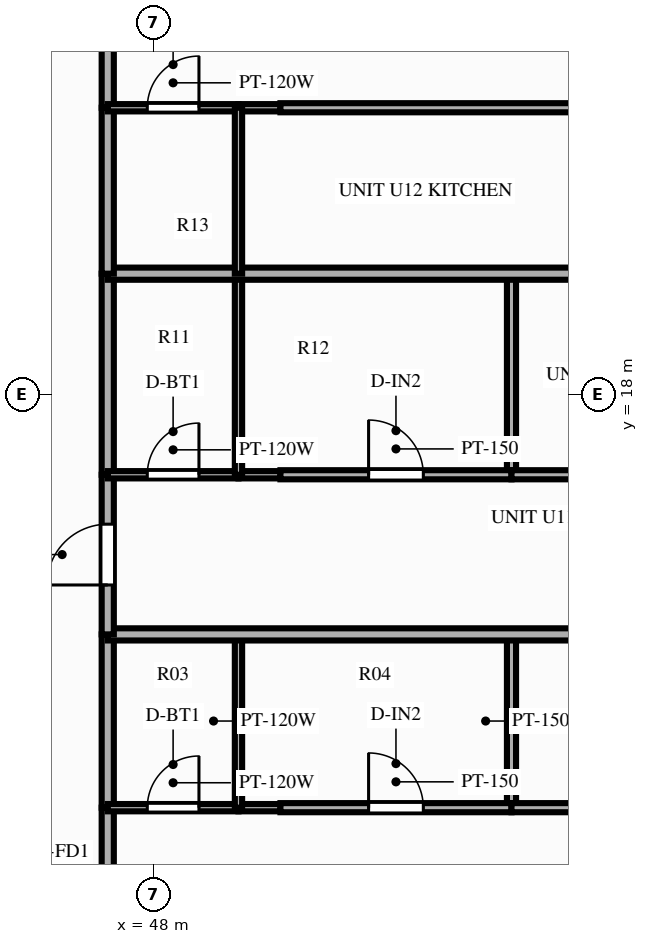
"""IFC4 building model, lengths in metres.
Left out: names, types, materials, properties, quantities, classifications, styles, units other than length and angle.
Written with IfcOpenShell. Run it as: python <this file> out.ifc"""

import sys

from ifc_helpers import new_model, si_unit, direction, frame, frame_2d, origin, place, context, subcontext, project, spatial, rectangle, extrude, source, transform, mapped, element, fill, save


model = new_model("IFC4")
c1 = context("Model", 3, precision=1e-05, world=origin(), true_north=direction((0.0, 1.0)))
c2 = subcontext(c1, "Body", "Model", "MODEL_VIEW")
j1 = project(units=[si_unit("LENGTHUNIT", "METRE"), si_unit("PLANEANGLEUNIT", "RADIAN")], contexts=[c1])
p1 = place(None, origin())
s1 = spatial("IfcSite", under=j1, at=p1, CompositionType="ELEMENT")
p2 = place(p1, origin())
s2 = spatial("IfcBuilding", under=s1, at=p2, CompositionType="ELEMENT")
p3 = place(p2, frame((0.0, 0.0, 116.85)))
s3 = spatial("IfcBuildingStorey", under=s2, at=p3, CompositionType="ELEMENT", Elevation=116.85)
p4 = place(p3, frame((47.25, 7.38, 0.0), z_axis=(0.0, 0.0, 1.0), x_axis=(0.0, 1.0, 0.0)))
e1 = element("IfcWall", 1, at=p4, inside=s3, PredefinedType="PARTITIONING", context=c2, shape_type="SweptSolid", body=[
    extrude(rectangle(XDim=3.824, YDim=0.2, at=frame_2d((1.912, 0.0))), origin(), (0.0, 0.0, 1.0), 2.79),
])
p5 = place(p4, frame((1.412, 0.0, 0.0)))
e2 = element("IfcOpeningElement", 2, at=p5, cuts=e1, PredefinedType="OPENING", context=c2, shape_type="SweptSolid", body=[
    extrude(rectangle(XDim=1.0, YDim=2.15, at=frame_2d((0.5, 1.075))), frame((0.0, 0.112, 0.0), z_axis=(0.0, -1.0, 0.0), x_axis=(1.0, 0.0, 0.0)), (0.0, 0.0, 1.0), 0.224),
])
p6 = place(p3, frame((47.25, 11.204, 0.0), z_axis=(0.0, 0.0, 1.0), x_axis=(0.0, 1.0, 0.0)))
e3 = element("IfcWall", 3, at=p6, inside=s3, PredefinedType="PARTITIONING", context=c2, shape_type="SweptSolid", body=[
    extrude(rectangle(XDim=2.85, YDim=0.2, at=frame_2d((1.425, 0.0))), origin(), (0.0, 0.0, 1.0), 2.79),
])
p7 = place(p3, frame((47.25, 11.204, 0.0), z_axis=(0.0, 0.0, 1.0), x_axis=(1.0, 0.0, 0.0)))
e4 = element("IfcWall", 4, at=p7, inside=s3, PredefinedType="PARTITIONING", context=c2, shape_type="SweptSolid", body=[
    extrude(rectangle(XDim=2.15, YDim=0.12, at=frame_2d((1.075, 0.0))), origin(), (0.0, 0.0, 1.0), 2.79),
])
p8 = place(p7, frame((0.65, 0.0, 0.0)))
e5 = element("IfcOpeningElement", 5, at=p8, cuts=e4, PredefinedType="OPENING", context=c2, shape_type="SweptSolid", body=[
    extrude(rectangle(XDim=0.85, YDim=2.05, at=frame_2d((0.425, 1.025))), frame((0.0, 0.072, 0.0), z_axis=(0.0, -1.0, 0.0), x_axis=(1.0, 0.0, 0.0)), (0.0, 0.0, 1.0), 0.144),
])
p9 = place(p3, frame((49.4, 11.204, 0.0), z_axis=(0.0, 0.0, 1.0), x_axis=(1.0, 0.0, 0.0)))
e6 = element("IfcWall", 6, at=p9, inside=s3, PredefinedType="PARTITIONING", context=c2, shape_type="SweptSolid", body=[
    extrude(rectangle(XDim=0.69, YDim=0.12, at=frame_2d((0.345, 0.0))), origin(), (0.0, 0.0, 1.0), 2.79),
])
p10 = place(p3, frame((49.4, 11.204, 0.0), z_axis=(0.0, 0.0, 1.0), x_axis=(0.0, 1.0, 0.0)))
e7 = element("IfcWall", 7, at=p10, inside=s3, PredefinedType="PARTITIONING", context=c2, shape_type="SweptSolid", body=[
    extrude(rectangle(XDim=2.85, YDim=0.12, at=frame_2d((1.425, 0.0))), origin(), (0.0, 0.0, 1.0), 2.79),
])
p11 = place(p3, frame((53.89, 11.204, 0.0), z_axis=(0.0, 0.0, 1.0), x_axis=(0.0, 1.0, 0.0)))
e8 = element("IfcWall", 8, at=p11, inside=s3, PredefinedType="PARTITIONING", context=c2, shape_type="SweptSolid", body=[
    extrude(rectangle(XDim=2.85, YDim=0.15, at=frame_2d((1.425, 0.0))), origin(), (0.0, 0.0, 1.0), 2.79),
])
p12 = place(p3, frame((50.09, 11.204, 0.0), z_axis=(0.0, 0.0, 1.0), x_axis=(1.0, 0.0, 0.0)))
e9 = element("IfcWall", 9, at=p12, inside=s3, PredefinedType="PARTITIONING", context=c2, shape_type="SweptSolid", body=[
    extrude(rectangle(XDim=3.8, YDim=0.15, at=frame_2d((1.9, 0.0))), origin(), (0.0, 0.0, 1.0), 2.79),
])
p13 = place(p12, frame((1.45, 0.0, 0.0)))
e10 = element("IfcOpeningElement", 10, at=p13, cuts=e9, PredefinedType="OPENING", context=c2, shape_type="SweptSolid", body=[
    extrude(rectangle(XDim=0.9, YDim=2.1, at=frame_2d((0.45, 1.05))), frame((0.0, 0.087, 0.0), z_axis=(0.0, -1.0, 0.0), x_axis=(1.0, 0.0, 0.0)), (0.0, 0.0, 1.0), 0.174),
])
p14 = place(p3, frame((53.89, 11.204, 0.0), z_axis=(0.0, 0.0, 1.0), x_axis=(1.0, 0.0, 0.0)))
e11 = element("IfcWall", 11, at=p14, inside=s3, PredefinedType="PARTITIONING", context=c2, shape_type="SweptSolid", body=[
    extrude(rectangle(XDim=9.96, YDim=0.15, at=frame_2d((4.98, 0.0))), origin(), (0.0, 0.0, 1.0), 2.79),
])
p15 = place(p14, frame((4.53, 0.0, 0.0)))
e12 = element("IfcOpeningElement", 12, at=p15, cuts=e11, PredefinedType="OPENING", context=c2, shape_type="SweptSolid", body=[
    extrude(rectangle(XDim=0.9, YDim=2.1, at=frame_2d((0.45, 1.05))), frame((0.0, 0.087, 0.0), z_axis=(0.0, -1.0, 0.0), x_axis=(1.0, 0.0, 0.0)), (0.0, 0.0, 1.0), 0.174),
])
p16 = place(p3, frame((47.25, 14.054, 0.0), z_axis=(0.0, 0.0, 1.0), x_axis=(1.0, 0.0, 0.0)))
e13 = element("IfcWall", 13, at=p16, inside=s3, PredefinedType="PARTITIONING", context=c2, shape_type="SweptSolid", body=[
    extrude(rectangle(XDim=16.6, YDim=0.2, at=frame_2d((8.3, 0.0))), origin(), (0.0, 0.0, 1.0), 2.79),
])
p17 = place(p3, frame((47.25, 14.054, 0.0), z_axis=(0.0, 0.0, 1.0), x_axis=(0.0, 1.0, 0.0)))
e14 = element("IfcWall", 14, at=p17, inside=s3, PredefinedType="PARTITIONING", context=c2, shape_type="SweptSolid", body=[
    extrude(rectangle(XDim=2.625, YDim=0.2, at=frame_2d((1.313, 0.0))), origin(), (0.0, 0.0, 1.0), 2.79),
])
p18 = place(p17, frame((0.813, 0.0, 0.0)))
e15 = element("IfcOpeningElement", 15, at=p18, cuts=e14, PredefinedType="OPENING", context=c2, shape_type="SweptSolid", body=[
    extrude(rectangle(XDim=1.0, YDim=2.15, at=frame_2d((0.5, 1.075))), frame((0.0, 0.112, 0.0), z_axis=(0.0, -1.0, 0.0), x_axis=(1.0, 0.0, 0.0)), (0.0, 0.0, 1.0), 0.224),
])
p19 = place(p3, frame((47.25, 16.68, 0.0), z_axis=(0.0, 0.0, 1.0), x_axis=(0.0, 1.0, 0.0)))
e16 = element("IfcWall", 16, at=p19, inside=s3, PredefinedType="PARTITIONING", context=c2, shape_type="SweptSolid", body=[
    extrude(rectangle(XDim=3.307, YDim=0.2, at=frame_2d((1.654, 0.0))), origin(), (0.0, 0.0, 1.0), 2.79),
])
p20 = place(p3, frame((47.25, 16.68, 0.0), z_axis=(0.0, 0.0, 1.0), x_axis=(1.0, 0.0, 0.0)))
e17 = element("IfcWall", 17, at=p20, inside=s3, PredefinedType="PARTITIONING", context=c2, shape_type="SweptSolid", body=[
    extrude(rectangle(XDim=2.15, YDim=0.12, at=frame_2d((1.075, 0.0))), origin(), (0.0, 0.0, 1.0), 2.79),
])
p21 = place(p20, frame((0.65, 0.0, 0.0)))
e18 = element("IfcOpeningElement", 18, at=p21, cuts=e17, PredefinedType="OPENING", context=c2, shape_type="SweptSolid", body=[
    extrude(rectangle(XDim=0.85, YDim=2.05, at=frame_2d((0.425, 1.025))), frame((0.0, 0.072, 0.0), z_axis=(0.0, -1.0, 0.0), x_axis=(1.0, 0.0, 0.0)), (0.0, 0.0, 1.0), 0.144),
])
p22 = place(p3, frame((49.4, 16.68, 0.0), z_axis=(0.0, 0.0, 1.0), x_axis=(1.0, 0.0, 0.0)))
e19 = element("IfcWall", 19, at=p22, inside=s3, PredefinedType="PARTITIONING", context=c2, shape_type="SweptSolid", body=[
    extrude(rectangle(XDim=0.69, YDim=0.12, at=frame_2d((0.345, 0.0))), origin(), (0.0, 0.0, 1.0), 2.79),
])
p23 = place(p3, frame((49.4, 16.68, 0.0), z_axis=(0.0, 0.0, 1.0), x_axis=(0.0, 1.0, 0.0)))
e20 = element("IfcWall", 20, at=p23, inside=s3, PredefinedType="PARTITIONING", context=c2, shape_type="SweptSolid", body=[
    extrude(rectangle(XDim=3.307, YDim=0.12, at=frame_2d((1.654, 0.0))), origin(), (0.0, 0.0, 1.0), 2.79),
])
p24 = place(p3, frame((53.89, 16.68, 0.0), z_axis=(0.0, 0.0, 1.0), x_axis=(0.0, 1.0, 0.0)))
e21 = element("IfcWall", 21, at=p24, inside=s3, PredefinedType="PARTITIONING", context=c2, shape_type="SweptSolid", body=[
    extrude(rectangle(XDim=3.307, YDim=0.15, at=frame_2d((1.654, 0.0))), origin(), (0.0, 0.0, 1.0), 2.79),
])
p25 = place(p3, frame((50.09, 16.68, 0.0), z_axis=(0.0, 0.0, 1.0), x_axis=(1.0, 0.0, 0.0)))
e22 = element("IfcWall", 22, at=p25, inside=s3, PredefinedType="PARTITIONING", context=c2, shape_type="SweptSolid", body=[
    extrude(rectangle(XDim=3.8, YDim=0.15, at=frame_2d((1.9, 0.0))), origin(), (0.0, 0.0, 1.0), 2.79),
])
p26 = place(p25, frame((1.45, 0.0, 0.0)))
e23 = element("IfcOpeningElement", 23, at=p26, cuts=e22, PredefinedType="OPENING", context=c2, shape_type="SweptSolid", body=[
    extrude(rectangle(XDim=0.9, YDim=2.1, at=frame_2d((0.45, 1.05))), frame((0.0, 0.087, 0.0), z_axis=(0.0, -1.0, 0.0), x_axis=(1.0, 0.0, 0.0)), (0.0, 0.0, 1.0), 0.174),
])
p27 = place(p3, frame((53.89, 16.68, 0.0), z_axis=(0.0, 0.0, 1.0), x_axis=(1.0, 0.0, 0.0)))
e24 = element("IfcWall", 24, at=p27, inside=s3, PredefinedType="PARTITIONING", context=c2, shape_type="SweptSolid", body=[
    extrude(rectangle(XDim=9.96, YDim=0.15, at=frame_2d((4.98, 0.0))), origin(), (0.0, 0.0, 1.0), 2.79),
])
p28 = place(p27, frame((4.53, 0.0, 0.0)))
e25 = element("IfcOpeningElement", 25, at=p28, cuts=e24, PredefinedType="OPENING", context=c2, shape_type="SweptSolid", body=[
    extrude(rectangle(XDim=0.9, YDim=2.1, at=frame_2d((0.45, 1.05))), frame((0.0, 0.087, 0.0), z_axis=(0.0, -1.0, 0.0), x_axis=(1.0, 0.0, 0.0)), (0.0, 0.0, 1.0), 0.174),
])
p29 = place(p3, frame((47.25, 19.987, 0.0), z_axis=(0.0, 0.0, 1.0), x_axis=(1.0, 0.0, 0.0)))
e26 = element("IfcWall", 26, at=p29, inside=s3, PredefinedType="PARTITIONING", context=c2, shape_type="SweptSolid", body=[
    extrude(rectangle(XDim=16.6, YDim=0.2, at=frame_2d((8.3, 0.0))), origin(), (0.0, 0.0, 1.0), 2.79),
])
p30 = place(p3, frame((47.25, 19.987, 0.0), z_axis=(0.0, 0.0, 1.0), x_axis=(0.0, 1.0, 0.0)))
e27 = element("IfcWall", 27, at=p30, inside=s3, PredefinedType="PARTITIONING", context=c2, shape_type="SweptSolid", body=[
    extrude(rectangle(XDim=2.729, YDim=0.2, at=frame_2d((1.365, 0.0))), origin(), (0.0, 0.0, 1.0), 2.79),
])
p31 = place(p3, frame((47.25, 22.716, 0.0), z_axis=(0.0, 0.0, 1.0), x_axis=(0.0, 1.0, 0.0)))
e28 = element("IfcWall", 28, at=p31, inside=s3, PredefinedType="PARTITIONING", context=c2, shape_type="SweptSolid", body=[
    extrude(rectangle(XDim=3.204, YDim=0.2, at=frame_2d((1.602, 0.0))), origin(), (0.0, 0.0, 1.0), 2.79),
])
p32 = place(p31, frame((1.102, 0.0, 0.0)))
e29 = element("IfcOpeningElement", 29, at=p32, cuts=e28, PredefinedType="OPENING", context=c2, shape_type="SweptSolid", body=[
    extrude(rectangle(XDim=1.0, YDim=2.15, at=frame_2d((0.5, 1.075))), frame((0.0, 0.112, 0.0), z_axis=(0.0, -1.0, 0.0), x_axis=(1.0, 0.0, 0.0)), (0.0, 0.0, 1.0), 0.224),
])
p33 = place(p3, frame((47.25, 22.716, 0.0), z_axis=(0.0, 0.0, 1.0), x_axis=(1.0, 0.0, 0.0)))
e30 = element("IfcWall", 30, at=p33, inside=s3, PredefinedType="PARTITIONING", context=c2, shape_type="SweptSolid", body=[
    extrude(rectangle(XDim=2.15, YDim=0.12, at=frame_2d((1.075, 0.0))), origin(), (0.0, 0.0, 1.0), 2.79),
])
p34 = place(p33, frame((0.65, 0.0, 0.0)))
e31 = element("IfcOpeningElement", 31, at=p34, cuts=e30, PredefinedType="OPENING", context=c2, shape_type="SweptSolid", body=[
    extrude(rectangle(XDim=0.85, YDim=2.05, at=frame_2d((0.425, 1.025))), frame((0.0, 0.072, 0.0), z_axis=(0.0, -1.0, 0.0), x_axis=(1.0, 0.0, 0.0)), (0.0, 0.0, 1.0), 0.144),
])
p35 = place(p3, frame((49.4, 22.716, 0.0), z_axis=(0.0, 0.0, 1.0), x_axis=(1.0, 0.0, 0.0)))
e32 = element("IfcWall", 32, at=p35, inside=s3, PredefinedType="PARTITIONING", context=c2, shape_type="SweptSolid", body=[
    extrude(rectangle(XDim=0.69, YDim=0.12, at=frame_2d((0.345, 0.0))), origin(), (0.0, 0.0, 1.0), 2.79),
])
p36 = place(p3, frame((49.4, 19.987, 0.0), z_axis=(0.0, 0.0, 1.0), x_axis=(0.0, 1.0, 0.0)))
e33 = element("IfcWall", 33, at=p36, inside=s3, PredefinedType="PARTITIONING", context=c2, shape_type="SweptSolid", body=[
    extrude(rectangle(XDim=2.729, YDim=0.12, at=frame_2d((1.365, 0.0))), origin(), (0.0, 0.0, 1.0), 2.79),
])
p37 = place(p3, frame((50.09, 22.716, 0.0), z_axis=(0.0, 0.0, 1.0), x_axis=(1.0, 0.0, 0.0)))
e34 = element("IfcWall", 34, at=p37, inside=s3, PredefinedType="PARTITIONING", context=c2, shape_type="SweptSolid", body=[
    extrude(rectangle(XDim=13.76, YDim=0.15, at=frame_2d((6.88, 0.0))), origin(), (0.0, 0.0, 1.0), 2.79),
])
p38 = place(p37, frame((5.914, 0.0, 0.0)))
e35 = element("IfcOpeningElement", 35, at=p38, cuts=e34, PredefinedType="OPENING", context=c2, shape_type="SweptSolid", body=[
    extrude(rectangle(XDim=0.9, YDim=2.1, at=frame_2d((0.45, 1.05))), frame((0.0, 0.087, 0.0), z_axis=(0.0, -1.0, 0.0), x_axis=(1.0, 0.0, 0.0)), (0.0, 0.0, 1.0), 0.174),
])
m1 = source(origin(), c2, "Body", "SweptSolid", [
    extrude(rectangle(XDim=0.85, YDim=2.05, at=frame_2d((0.425, 1.025))), frame((0.0, 0.025, 0.0), z_axis=(0.0, -1.0, 0.0), x_axis=(1.0, 0.0, 0.0)), (0.0, 0.0, 1.0), 0.05),
])
p39 = place(p8, origin())
e36 = element("IfcDoor", 36, at=p39, inside=s3, OperationType="SINGLE_SWING_RIGHT", PredefinedType="DOOR", context=c2, shape_type="MappedRepresentation", body=[
    mapped(m1, transform((0.0, 0.0, 0.0), scale=1.0)),
])
fill(e5, e36)
m2 = source(origin(), c2, "Body", "SweptSolid", [
    extrude(rectangle(XDim=0.9, YDim=2.1, at=frame_2d((0.45, 1.05))), frame((0.0, 0.025, 0.0), z_axis=(0.0, -1.0, 0.0), x_axis=(1.0, 0.0, 0.0)), (0.0, 0.0, 1.0), 0.05),
])
p40 = place(p13, origin())
e37 = element("IfcDoor", 37, at=p40, inside=s3, OperationType="SINGLE_SWING_LEFT", PredefinedType="DOOR", context=c2, shape_type="MappedRepresentation", body=[
    mapped(m2, transform((0.0, 0.0, 0.0), scale=1.0)),
])
fill(e10, e37)
m3 = source(origin(), c2, "Body", "SweptSolid", [
    extrude(rectangle(XDim=1.0, YDim=2.15, at=frame_2d((0.5, 1.075))), frame((0.0, 0.025, 0.0), z_axis=(0.0, -1.0, 0.0), x_axis=(1.0, 0.0, 0.0)), (0.0, 0.0, 1.0), 0.05),
])
p41 = place(p18, origin())
e38 = element("IfcDoor", 38, at=p41, inside=s3, OperationType="SINGLE_SWING_LEFT", PredefinedType="DOOR", context=c2, shape_type="MappedRepresentation", body=[
    mapped(m3, transform((0.0, 0.0, 0.0), scale=1.0)),
])
fill(e15, e38)
p42 = place(p21, origin())
e39 = element("IfcDoor", 39, at=p42, inside=s3, OperationType="SINGLE_SWING_RIGHT", PredefinedType="DOOR", context=c2, shape_type="MappedRepresentation", body=[
    mapped(m1, transform((0.0, 0.0, 0.0), scale=1.0)),
])
fill(e18, e39)
p43 = place(p26, origin())
e40 = element("IfcDoor", 40, at=p43, inside=s3, OperationType="SINGLE_SWING_LEFT", PredefinedType="DOOR", context=c2, shape_type="MappedRepresentation", body=[
    mapped(m2, transform((0.0, 0.0, 0.0), scale=1.0)),
])
fill(e23, e40)
p44 = place(p34, origin())
e41 = element("IfcDoor", 41, at=p44, inside=s3, OperationType="SINGLE_SWING_RIGHT", PredefinedType="DOOR", context=c2, shape_type="MappedRepresentation", body=[
    mapped(m1, transform((0.0, 0.0, 0.0), scale=1.0)),
])
fill(e31, e41)
save(model, sys.argv[1])
